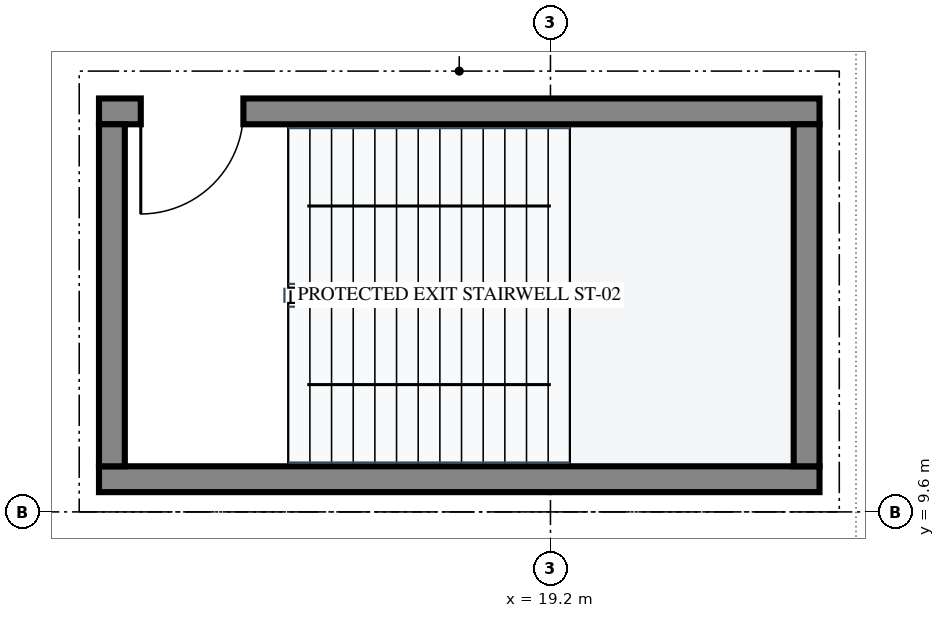
"""IFC4 building model, lengths in metres.
Left out: names, types, materials, properties, quantities, classifications, styles, units other than length and angle.
Written with IfcOpenShell. Run it as: python <this file> out.ifc"""

import sys

from ifc_helpers import new_model, si_unit, direction, frame, frame_2d, origin, place, context, subcontext, project, spatial, rectangle, extrude, element, fill, save


model = new_model("IFC4")
c1 = context("Model", 3, precision=1e-05, world=origin(), true_north=direction((0.0, 1.0)))
c2 = subcontext(c1, "Body", "Model", "MODEL_VIEW")
j1 = project(units=[si_unit("LENGTHUNIT", "METRE"), si_unit("PLANEANGLEUNIT", "RADIAN")], contexts=[c1])
p1 = place(None, origin())
s1 = spatial("IfcSite", under=j1, at=p1, CompositionType="ELEMENT")
p2 = place(p1, origin())
s2 = spatial("IfcBuilding", under=s1, at=p2, CompositionType="ELEMENT")
p3 = place(p2, frame((0.0, 0.0, 24.6)))
s3 = spatial("IfcBuildingStorey", under=s2, at=p3, CompositionType="ELEMENT", Elevation=24.6)
p4 = place(p3, frame((13.26, 10.03, 0.0), z_axis=(0.0, 0.0, 1.0), x_axis=(1.0, 0.0, 0.0)))
e1 = element("IfcWall", 1, at=p4, inside=s3, PredefinedType="SHEAR", context=c2, shape_type="SweptSolid", body=[
    extrude(rectangle(XDim=9.48, YDim=0.34, at=frame_2d((4.74, 0.0))), origin(), (0.0, 0.0, 1.0), 4.51),
])
p5 = place(p3, frame((13.26, 14.87, 0.0), z_axis=(0.0, 0.0, 1.0), x_axis=(1.0, 0.0, 0.0)))
e2 = element("IfcWall", 2, at=p5, inside=s3, PredefinedType="SHEAR", context=c2, shape_type="SweptSolid", body=[
    extrude(rectangle(XDim=9.48, YDim=0.34, at=frame_2d((4.74, 0.0))), origin(), (0.0, 0.0, 1.0), 4.51),
])
p6 = place(p5, frame((0.55, 0.0, 0.0)))
e3 = element("IfcOpeningElement", 3, at=p6, cuts=e2, PredefinedType="OPENING", context=c2, shape_type="SweptSolid", body=[
    extrude(rectangle(XDim=1.35, YDim=2.2, at=frame_2d((0.675, 1.1))), frame((0.0, 0.182, 0.0), z_axis=(0.0, -1.0, 0.0), x_axis=(1.0, 0.0, 0.0)), (0.0, 0.0, 1.0), 0.364),
])
for number, where, z_axis, x_axis in (
    (4, (22.57, 10.2, 0.0), (0.0, 0.0, 1.0), (0.0, 1.0, 0.0)),
    (5, (13.43, 10.2, 0.0), (0.0, 0.0, 1.0), (0.0, 1.0, 0.0)),
):
    element("IfcWall", number, at=place(p3, frame(where, z_axis=z_axis, x_axis=x_axis)), inside=s3, PredefinedType="SHEAR", context=c2, shape_type="SweptSolid", body=[
        extrude(rectangle(XDim=4.5, YDim=0.34, at=frame_2d((2.25, 0.0))), origin(), (0.0, 0.0, 1.0), 4.51),
    ])
p7 = place(p6, frame((1.35, 0.0, 0.0), z_axis=(0.0, 0.0, 1.0), x_axis=(-1.0, 0.0, 0.0)))
e6 = element("IfcDoor", 6, at=p7, inside=s3, OperationType="SINGLE_SWING_RIGHT", PredefinedType="DOOR", context=c2, shape_type="SweptSolid", body=[
    extrude(rectangle(XDim=1.35, YDim=2.2, at=frame_2d((0.675, 1.1))), frame((0.0, 0.025, 0.0), z_axis=(0.0, -1.0, 0.0), x_axis=(1.0, 0.0, 0.0)), (0.0, 0.0, 1.0), 0.05),
])
fill(e3, e6)
save(model, sys.argv[1])
